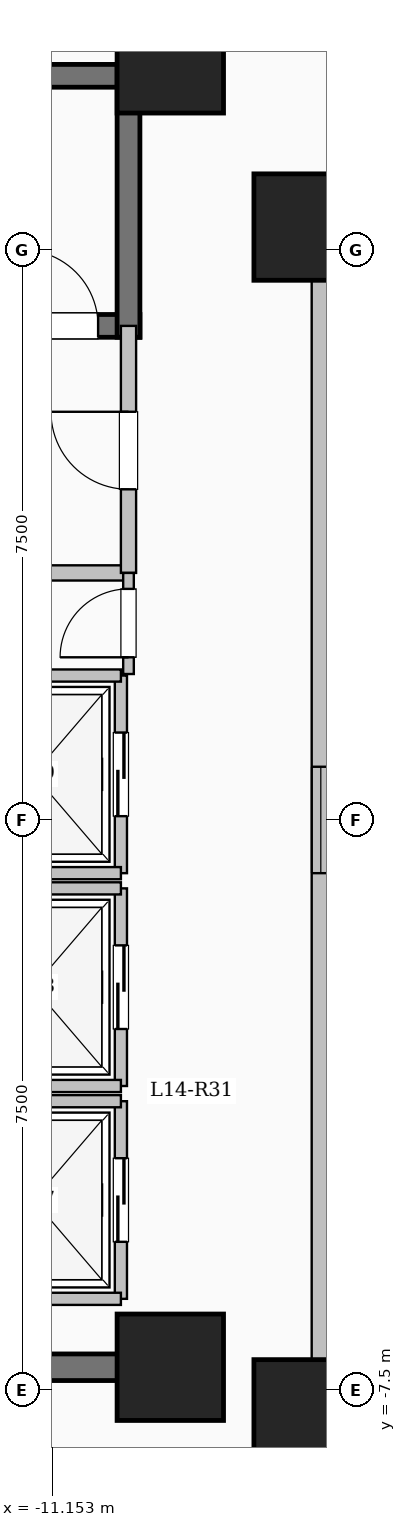
"""IFC4 building model, lengths in metres.
Left out: names, types, materials, properties, quantities, classifications, styles, units other than length and angle.
Written with IfcOpenShell. Run it as: python <this file> out.ifc"""

import sys

from ifc_helpers import new_model, si_unit, direction, frame, frame_2d, origin, origin_2d, place, context, subcontext, project, spatial, rectangle, extrude, element, fill, save


model = new_model("IFC4")
c1 = context("Model", 3, precision=1e-05, world=origin(), true_north=direction((0.0, 1.0)))
c2 = subcontext(c1, "Body", "Model", "MODEL_VIEW")
j1 = project(units=[si_unit("LENGTHUNIT", "METRE"), si_unit("PLANEANGLEUNIT", "RADIAN")], contexts=[c1])
p1 = place(None, origin())
s1 = spatial("IfcSite", under=j1, at=p1, CompositionType="ELEMENT")
p2 = place(p1, origin())
s2 = spatial("IfcBuilding", under=s1, at=p2, CompositionType="ELEMENT")
p3 = place(p2, frame((0.0, 0.0, 54.15)))
s3 = spatial("IfcBuildingStorey", under=s2, at=p3, CompositionType="ELEMENT", Elevation=54.15)
for number, where, z_axis, x_axis in (
    (1, (-7.8, -7.8, 0.0), (0.0, 0.0, 1.0), (1.0, 0.0, 0.0)),
    (2, (-7.8, 7.8, 0.0), (0.0, 0.0, 1.0), (1.0, 0.0, 0.0)),
    (3, (-9.6, -7.2, 0.0), (0.0, 0.0, 1.0), (1.0, 0.0, 0.0)),
    (4, (-9.6, 10.0, 0.0), (0.0, 0.0, 1.0), (1.0, 0.0, 0.0)),
):
    element("IfcColumn", number, at=place(p3, frame(where, z_axis=z_axis, x_axis=x_axis)), inside=s3, PredefinedType="COLUMN", context=c2, shape_type="SweptSolid", body=[
        extrude(rectangle(XDim=1.4, YDim=1.4, at=origin_2d()), origin(), (0.0, 0.0, 1.0), 3.35),
    ])
p4 = place(p3, frame((-7.62, -7.62, 0.0), z_axis=(0.0, 0.0, 1.0), x_axis=(1.0, 0.0, 0.0)))
e5 = element("IfcWall", 5, at=p4, inside=s3, PredefinedType="SOLIDWALL", context=c2, shape_type="SweptSolid", body=[
    extrude(rectangle(XDim=15.24, YDim=0.24, at=frame_2d((7.62, 0.0))), origin(), (0.0, 0.0, 1.0), 3.1),
])
p5 = place(p4, frame((6.92, 0.0, 0.95)))
e6 = element("IfcOpeningElement", 6, at=p5, cuts=e5, PredefinedType="OPENING", context=c2, shape_type="SweptSolid", body=[
    extrude(rectangle(XDim=1.4, YDim=1.5, at=frame_2d((0.7, 0.75))), frame((0.0, 0.13, 0.0), z_axis=(0.0, -1.0, 0.0), x_axis=(1.0, 0.0, 0.0)), (0.0, 0.0, 1.0), 0.26),
])
p6 = place(p3, frame((7.62, 7.62, 0.0), z_axis=(0.0, 0.0, 1.0), x_axis=(-1.0, 0.0, 0.0)))
e7 = element("IfcWall", 7, at=p6, inside=s3, PredefinedType="SOLIDWALL", context=c2, shape_type="SweptSolid", body=[
    extrude(rectangle(XDim=15.24, YDim=0.24, at=frame_2d((7.62, 0.0))), origin(), (0.0, 0.0, 1.0), 3.1),
])
p7 = place(p6, frame((6.92, 0.0, 0.95)))
e8 = element("IfcOpeningElement", 8, at=p7, cuts=e7, PredefinedType="OPENING", context=c2, shape_type="SweptSolid", body=[
    extrude(rectangle(XDim=1.4, YDim=1.5, at=frame_2d((0.7, 0.75))), frame((0.0, 0.13, 0.0), z_axis=(0.0, -1.0, 0.0), x_axis=(1.0, 0.0, 0.0)), (0.0, 0.0, 1.0), 0.26),
])
p8 = place(p3, frame((-7.62, 7.62, 0.0), z_axis=(0.0, 0.0, 1.0), x_axis=(0.0, -1.0, 0.0)))
e9 = element("IfcWall", 9, at=p8, inside=s3, PredefinedType="SOLIDWALL", context=c2, shape_type="SweptSolid", body=[
    extrude(rectangle(XDim=15.24, YDim=0.24, at=frame_2d((7.62, 0.0))), origin(), (0.0, 0.0, 1.0), 3.1),
])
p9 = place(p8, frame((6.92, 0.0, 0.95)))
e10 = element("IfcOpeningElement", 10, at=p9, cuts=e9, PredefinedType="OPENING", context=c2, shape_type="SweptSolid", body=[
    extrude(rectangle(XDim=1.4, YDim=1.5, at=frame_2d((0.7, 0.75))), frame((0.0, 0.13, 0.0), z_axis=(0.0, -1.0, 0.0), x_axis=(1.0, 0.0, 0.0)), (0.0, 0.0, 1.0), 0.26),
])
p10 = place(p3, frame((-18.0, 9.79, 0.0), z_axis=(0.0, 0.0, 1.0), x_axis=(1.0, 0.0, 0.0)))
e11 = element("IfcWall", 11, at=p10, inside=s3, PredefinedType="SHEAR", context=c2, shape_type="SweptSolid", body=[
    extrude(rectangle(XDim=8.0, YDim=0.3, at=frame_2d((4.0, 0.0))), origin(), (0.0, 0.0, 1.0), 3.35),
])
p11 = place(p3, frame((-18.0, 6.5, 0.0), z_axis=(0.0, 0.0, 1.0), x_axis=(1.0, 0.0, 0.0)))
e12 = element("IfcWall", 12, at=p11, inside=s3, PredefinedType="SHEAR", context=c2, shape_type="SweptSolid", body=[
    extrude(rectangle(XDim=8.0, YDim=0.3, at=frame_2d((4.0, 0.0))), origin(), (0.0, 0.0, 1.0), 3.35),
])
p12 = place(p11, frame((6.45, 0.0, 0.0)))
e13 = element("IfcOpeningElement", 13, at=p12, cuts=e12, PredefinedType="OPENING", context=c2, shape_type="SweptSolid", body=[
    extrude(rectangle(XDim=1.0, YDim=2.15, at=frame_2d((0.5, 1.075))), frame((0.0, 0.16, 0.0), z_axis=(0.0, -1.0, 0.0), x_axis=(1.0, 0.0, 0.0)), (0.0, 0.0, 1.0), 0.32),
])
p13 = place(p3, frame((-10.15, 6.35, 0.0), z_axis=(0.0, 0.0, 1.0), x_axis=(0.0, 1.0, 0.0)))
e14 = element("IfcWall", 14, at=p13, inside=s3, PredefinedType="SHEAR", context=c2, shape_type="SweptSolid", body=[
    extrude(rectangle(XDim=3.59, YDim=0.3, at=frame_2d((1.795, 0.0))), origin(), (0.0, 0.0, 1.0), 3.35),
])
p14 = place(p3, frame((-15.55, 3.25, 0.0), z_axis=(0.0, 0.0, 1.0), x_axis=(1.0, 0.0, 0.0)))
e15 = element("IfcWall", 15, at=p14, inside=s3, PredefinedType="SOLIDWALL", context=c2, shape_type="SweptSolid", body=[
    extrude(rectangle(XDim=5.4, YDim=0.2, at=frame_2d((2.7, 0.0))), origin(), (0.0, 0.0, 1.0), 3.1),
])
p15 = place(p3, frame((-10.15, 3.25, 0.0), z_axis=(0.0, 0.0, 1.0), x_axis=(0.0, 1.0, 0.0)))
e16 = element("IfcWall", 16, at=p15, inside=s3, PredefinedType="SOLIDWALL", context=c2, shape_type="SweptSolid", body=[
    extrude(rectangle(XDim=3.25, YDim=0.2, at=frame_2d((1.625, 0.0))), origin(), (0.0, 0.0, 1.0), 3.1),
])
p16 = place(p15, frame((1.1, 0.0, 0.0)))
e17 = element("IfcOpeningElement", 17, at=p16, cuts=e16, PredefinedType="OPENING", context=c2, shape_type="SweptSolid", body=[
    extrude(rectangle(XDim=1.02, YDim=2.15, at=frame_2d((0.51, 1.075))), frame((0.0, 0.11, 0.0), z_axis=(0.0, -1.0, 0.0), x_axis=(1.0, 0.0, 0.0)), (0.0, 0.0, 1.0), 0.22),
])
p17 = place(p3, frame((-10.25, -6.3, 0.0), z_axis=(0.0, 0.0, 1.0), x_axis=(0.0, 1.0, 0.0)))
e18 = element("IfcWall", 18, at=p17, inside=s3, PredefinedType="SOLIDWALL", context=c2, shape_type="SweptSolid", body=[
    extrude(rectangle(XDim=2.6, YDim=0.16, at=frame_2d((1.3, 0.0))), origin(), (0.0, 0.0, 1.0), 3.1),
])
p18 = place(p17, frame((0.75, 0.0, 0.0)))
e19 = element("IfcOpeningElement", 19, at=p18, cuts=e18, PredefinedType="OPENING", context=c2, shape_type="SweptSolid", body=[
    extrude(rectangle(XDim=1.1, YDim=2.15, at=frame_2d((0.55, 1.075))), frame((0.0, 0.09, 0.0), z_axis=(0.0, -1.0, 0.0), x_axis=(1.0, 0.0, 0.0)), (0.0, 0.0, 1.0), 0.18),
])
for number, where, z_axis, x_axis in (
    (20, (-12.55, -6.3, 0.0), (0.0, 0.0, 1.0), (1.0, 0.0, 0.0)),
    (21, (-12.55, -3.7, 0.0), (0.0, 0.0, 1.0), (1.0, 0.0, 0.0)),
):
    element("IfcWall", number, at=place(p3, frame(where, z_axis=z_axis, x_axis=x_axis)), inside=s3, PredefinedType="SOLIDWALL", context=c2, shape_type="SweptSolid", body=[
        extrude(rectangle(XDim=2.3, YDim=0.16, at=frame_2d((1.15, 0.0))), origin(), (0.0, 0.0, 1.0), 3.1),
    ])
p19 = place(p3, frame((-10.25, -3.5, 0.0), z_axis=(0.0, 0.0, 1.0), x_axis=(0.0, 1.0, 0.0)))
e22 = element("IfcWall", 22, at=p19, inside=s3, PredefinedType="SOLIDWALL", context=c2, shape_type="SweptSolid", body=[
    extrude(rectangle(XDim=2.6, YDim=0.16, at=frame_2d((1.3, 0.0))), origin(), (0.0, 0.0, 1.0), 3.1),
])
p20 = place(p19, frame((0.75, 0.0, 0.0)))
e23 = element("IfcOpeningElement", 23, at=p20, cuts=e22, PredefinedType="OPENING", context=c2, shape_type="SweptSolid", body=[
    extrude(rectangle(XDim=1.1, YDim=2.15, at=frame_2d((0.55, 1.075))), frame((0.0, 0.09, 0.0), z_axis=(0.0, -1.0, 0.0), x_axis=(1.0, 0.0, 0.0)), (0.0, 0.0, 1.0), 0.18),
])
for number, where, z_axis, x_axis in (
    (24, (-12.55, -3.5, 0.0), (0.0, 0.0, 1.0), (1.0, 0.0, 0.0)),
    (25, (-12.55, -0.9, 0.0), (0.0, 0.0, 1.0), (1.0, 0.0, 0.0)),
):
    element("IfcWall", number, at=place(p3, frame(where, z_axis=z_axis, x_axis=x_axis)), inside=s3, PredefinedType="SOLIDWALL", context=c2, shape_type="SweptSolid", body=[
        extrude(rectangle(XDim=2.3, YDim=0.16, at=frame_2d((1.15, 0.0))), origin(), (0.0, 0.0, 1.0), 3.1),
    ])
p21 = place(p3, frame((-10.25, -0.7, 0.0), z_axis=(0.0, 0.0, 1.0), x_axis=(0.0, 1.0, 0.0)))
e26 = element("IfcWall", 26, at=p21, inside=s3, PredefinedType="SOLIDWALL", context=c2, shape_type="SweptSolid", body=[
    extrude(rectangle(XDim=2.6, YDim=0.16, at=frame_2d((1.3, 0.0))), origin(), (0.0, 0.0, 1.0), 3.1),
])
p22 = place(p21, frame((0.75, 0.0, 0.0)))
e27 = element("IfcOpeningElement", 27, at=p22, cuts=e26, PredefinedType="OPENING", context=c2, shape_type="SweptSolid", body=[
    extrude(rectangle(XDim=1.1, YDim=2.15, at=frame_2d((0.55, 1.075))), frame((0.0, 0.09, 0.0), z_axis=(0.0, -1.0, 0.0), x_axis=(1.0, 0.0, 0.0)), (0.0, 0.0, 1.0), 0.18),
])
for number, where, z_axis, x_axis in (
    (28, (-12.55, -0.7, 0.0), (0.0, 0.0, 1.0), (1.0, 0.0, 0.0)),
    (29, (-12.55, 1.9, 0.0), (0.0, 0.0, 1.0), (1.0, 0.0, 0.0)),
):
    element("IfcWall", number, at=place(p3, frame(where, z_axis=z_axis, x_axis=x_axis)), inside=s3, PredefinedType="SOLIDWALL", context=c2, shape_type="SweptSolid", body=[
        extrude(rectangle(XDim=2.3, YDim=0.16, at=frame_2d((1.15, 0.0))), origin(), (0.0, 0.0, 1.0), 3.1),
    ])
p23 = place(p3, frame((-18.625, -7.2, 0.0), z_axis=(0.0, 0.0, 1.0), x_axis=(1.0, 0.0, 0.0)))
e30 = element("IfcWall", 30, at=p23, inside=s3, PredefinedType="SHEAR", context=c2, shape_type="SweptSolid", body=[
    extrude(rectangle(XDim=8.55, YDim=0.35, at=frame_2d((4.275, 0.0))), origin(), (0.0, 0.0, 1.0), 3.35),
])
p24 = place(p3, frame((-10.15, 1.92, 0.0), z_axis=(0.0, 0.0, 1.0), x_axis=(0.0, 1.0, 0.0)))
e31 = element("IfcWall", 31, at=p24, inside=s3, PredefinedType="PARTITIONING", context=c2, shape_type="SweptSolid", body=[
    extrude(rectangle(XDim=1.33, YDim=0.14, at=frame_2d((0.665, 0.0))), origin(), (0.0, 0.0, 1.0), 3.1),
])
p25 = place(p24, frame((0.22, 0.0, 0.0)))
e32 = element("IfcOpeningElement", 32, at=p25, cuts=e31, PredefinedType="OPENING", context=c2, shape_type="SweptSolid", body=[
    extrude(rectangle(XDim=0.9, YDim=2.08, at=frame_2d((0.45, 1.04))), frame((0.0, 0.08, 0.0), z_axis=(0.0, -1.0, 0.0), x_axis=(1.0, 0.0, 0.0)), (0.0, 0.0, 1.0), 0.16),
])
p26 = place(p9, origin())
e33 = element("IfcWindow", 33, at=p26, inside=s3, PartitioningType="SINGLE_PANEL", PredefinedType="WINDOW", context=c2, shape_type="SweptSolid", body=[
    extrude(rectangle(XDim=1.4, YDim=1.5, at=frame_2d((0.7, 0.75))), frame((0.0, 0.03, 0.0), z_axis=(0.0, -1.0, 0.0), x_axis=(1.0, 0.0, 0.0)), (0.0, 0.0, 1.0), 0.06),
])
fill(e10, e33)
p27 = place(p12, origin())
e34 = element("IfcDoor", 34, at=p27, inside=s3, OperationType="SINGLE_SWING_LEFT", PredefinedType="DOOR", context=c2, shape_type="SweptSolid", body=[
    extrude(rectangle(XDim=1.0, YDim=2.15, at=frame_2d((0.5, 1.075))), frame((0.0, 0.025, 0.0), z_axis=(0.0, -1.0, 0.0), x_axis=(1.0, 0.0, 0.0)), (0.0, 0.0, 1.0), 0.05),
])
fill(e13, e34)
p28 = place(p16, origin())
e35 = element("IfcDoor", 35, at=p28, inside=s3, OperationType="SINGLE_SWING_RIGHT", PredefinedType="DOOR", context=c2, shape_type="SweptSolid", body=[
    extrude(rectangle(XDim=1.02, YDim=2.15, at=frame_2d((0.51, 1.075))), frame((0.0, 0.025, 0.0), z_axis=(0.0, -1.0, 0.0), x_axis=(1.0, 0.0, 0.0)), (0.0, 0.0, 1.0), 0.05),
])
fill(e17, e35)
p29 = place(p18, origin())
e36 = element("IfcDoor", 36, at=p29, inside=s3, OperationType="SLIDING_TO_LEFT", PredefinedType="DOOR", context=c2, shape_type="SweptSolid", body=[
    extrude(rectangle(XDim=1.1, YDim=2.15, at=frame_2d((0.55, 1.075))), frame((0.0, 0.025, 0.0), z_axis=(0.0, -1.0, 0.0), x_axis=(1.0, 0.0, 0.0)), (0.0, 0.0, 1.0), 0.05),
])
fill(e19, e36)
p30 = place(p20, origin())
e37 = element("IfcDoor", 37, at=p30, inside=s3, OperationType="SLIDING_TO_LEFT", PredefinedType="DOOR", context=c2, shape_type="SweptSolid", body=[
    extrude(rectangle(XDim=1.1, YDim=2.15, at=frame_2d((0.55, 1.075))), frame((0.0, 0.025, 0.0), z_axis=(0.0, -1.0, 0.0), x_axis=(1.0, 0.0, 0.0)), (0.0, 0.0, 1.0), 0.05),
])
fill(e23, e37)
p31 = place(p22, origin())
e38 = element("IfcDoor", 38, at=p31, inside=s3, OperationType="SLIDING_TO_LEFT", PredefinedType="DOOR", context=c2, shape_type="SweptSolid", body=[
    extrude(rectangle(XDim=1.1, YDim=2.15, at=frame_2d((0.55, 1.075))), frame((0.0, 0.025, 0.0), z_axis=(0.0, -1.0, 0.0), x_axis=(1.0, 0.0, 0.0)), (0.0, 0.0, 1.0), 0.05),
])
fill(e27, e38)
p32 = place(p25, origin())
e39 = element("IfcDoor", 39, at=p32, inside=s3, OperationType="SINGLE_SWING_LEFT", PredefinedType="DOOR", context=c2, shape_type="SweptSolid", body=[
    extrude(rectangle(XDim=0.9, YDim=2.08, at=frame_2d((0.45, 1.04))), frame((0.0, 0.025, 0.0), z_axis=(0.0, -1.0, 0.0), x_axis=(1.0, 0.0, 0.0)), (0.0, 0.0, 1.0), 0.05),
])
fill(e32, e39)
save(model, sys.argv[1])
